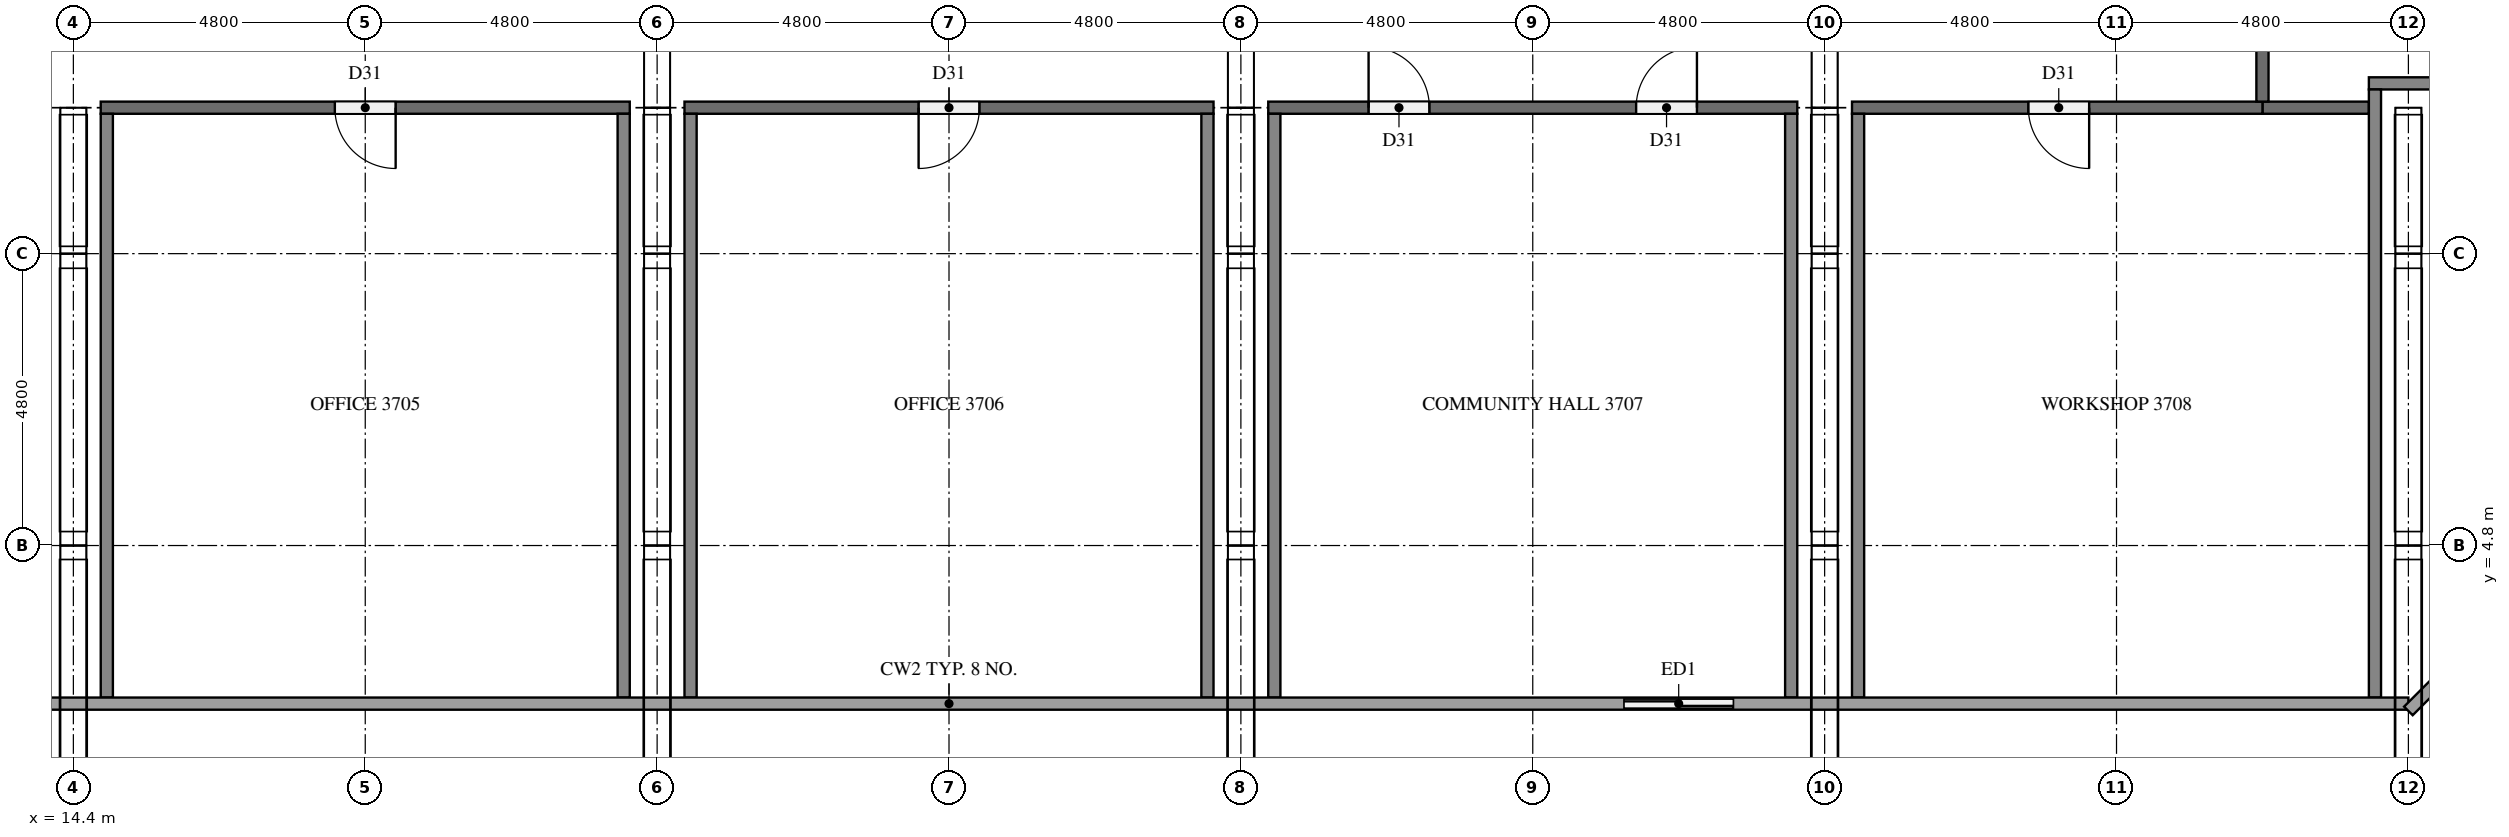
"""IFC4 building model, lengths in metres.
Left out: names, types, materials, properties, quantities, classifications, styles, units other than length and angle.
Written with IfcOpenShell. Run it as: python <this file> out.ifc"""

import sys

from ifc_helpers import new_model, si_unit, direction, frame, frame_2d, origin, place, context, subcontext, project, spatial, rectangle, extrude, element, fill, save


model = new_model("IFC4")
c1 = context("Model", 3, precision=1e-05, world=origin(), true_north=direction((0.0, 1.0)))
c2 = subcontext(c1, "Body", "Model", "MODEL_VIEW")
j1 = project(units=[si_unit("LENGTHUNIT", "METRE"), si_unit("PLANEANGLEUNIT", "RADIAN")], contexts=[c1])
p1 = place(None, origin())
s1 = spatial("IfcSite", under=j1, at=p1, CompositionType="ELEMENT")
p2 = place(p1, origin())
s2 = spatial("IfcBuilding", under=s1, at=p2, CompositionType="ELEMENT")
p3 = place(p2, frame((0.0, 0.0, 143.6)))
s3 = spatial("IfcBuildingStorey", under=s2, at=p3, CompositionType="ELEMENT", Elevation=143.6)
p4 = place(p3, frame((39.6, 2.2, 0.0), z_axis=(0.0, 0.0, 1.0), x_axis=(1.0, 0.0, 0.0)))
e1 = element("IfcWall", 1, at=p4, inside=s3, PredefinedType="SOLIDWALL", context=c2, shape_type="SweptSolid", body=[
    extrude(rectangle(XDim=2.4, YDim=0.15, at=frame_2d((1.2, 0.0))), origin(), (0.0, 0.0, 1.0), 5.1),
])
p5 = place(p4, frame((0.3, 0.0, 0.0)))
e2 = element("IfcOpeningElement", 2, at=p5, cuts=e1, PredefinedType="OPENING", context=c2, shape_type="SweptSolid", body=[
    extrude(rectangle(XDim=1.8, YDim=2.4, at=frame_2d((0.9, 1.2))), frame((0.0, 0.085, 0.0), z_axis=(0.0, -1.0, 0.0), x_axis=(1.0, 0.0, 0.0)), (0.0, 0.0, 1.0), 0.17),
])
p6 = place(p3, frame((50.4, 12.0, 0.0), z_axis=(0.0, 0.0, 1.0), x_axis=(1.0, 0.0, 0.0)))
e3 = element("IfcWall", 3, at=p6, inside=s3, PredefinedType="PARTITIONING", context=c2, shape_type="SweptSolid", body=[
    extrude(rectangle(XDim=1.75, YDim=0.2, at=frame_2d((0.875, 0.0))), origin(), (0.0, 0.0, 1.0), 5.1),
])
p7 = place(p3, frame((23.55, 12.0, 0.0), z_axis=(0.0, 0.0, 1.0), x_axis=(-1.0, 0.0, 0.0)))
e4 = element("IfcWall", 4, at=p7, inside=s3, PredefinedType="PARTITIONING", context=c2, shape_type="SweptSolid", body=[
    extrude(rectangle(XDim=8.7, YDim=0.2, at=frame_2d((4.35, 0.0))), origin(), (0.0, 0.0, 1.0), 5.1),
])
p8 = place(p7, frame((3.85, 0.0, 0.0)))
e5 = element("IfcOpeningElement", 5, at=p8, cuts=e4, PredefinedType="OPENING", context=c2, shape_type="SweptSolid", body=[
    extrude(rectangle(XDim=1.0, YDim=2.1, at=frame_2d((0.5, 1.05))), frame((0.0, 0.11, 0.0), z_axis=(0.0, -1.0, 0.0), x_axis=(1.0, 0.0, 0.0)), (0.0, 0.0, 1.0), 0.22),
])
p9 = place(p3, frame((33.15, 12.0, 0.0), z_axis=(0.0, 0.0, 1.0), x_axis=(-1.0, 0.0, 0.0)))
e6 = element("IfcWall", 6, at=p9, inside=s3, PredefinedType="PARTITIONING", context=c2, shape_type="SweptSolid", body=[
    extrude(rectangle(XDim=8.7, YDim=0.2, at=frame_2d((4.35, 0.0))), origin(), (0.0, 0.0, 1.0), 5.1),
])
p10 = place(p9, frame((3.85, 0.0, 0.0)))
e7 = element("IfcOpeningElement", 7, at=p10, cuts=e6, PredefinedType="OPENING", context=c2, shape_type="SweptSolid", body=[
    extrude(rectangle(XDim=1.0, YDim=2.1, at=frame_2d((0.5, 1.05))), frame((0.0, 0.11, 0.0), z_axis=(0.0, -1.0, 0.0), x_axis=(1.0, 0.0, 0.0)), (0.0, 0.0, 1.0), 0.22),
])
p11 = place(p3, frame((34.05, 12.0, 0.0), z_axis=(0.0, 0.0, 1.0), x_axis=(1.0, 0.0, 0.0)))
e8 = element("IfcWall", 8, at=p11, inside=s3, PredefinedType="PARTITIONING", context=c2, shape_type="SweptSolid", body=[
    extrude(rectangle(XDim=8.7, YDim=0.2, at=frame_2d((4.35, 0.0))), origin(), (0.0, 0.0, 1.0), 5.1),
])
p12 = place(p11, frame((6.05, 0.0, 0.0)))
e9 = element("IfcOpeningElement", 9, at=p12, cuts=e8, PredefinedType="OPENING", context=c2, shape_type="SweptSolid", body=[
    extrude(rectangle(XDim=1.0, YDim=2.1, at=frame_2d((0.5, 1.05))), frame((0.0, 0.11, 0.0), z_axis=(0.0, -1.0, 0.0), x_axis=(1.0, 0.0, 0.0)), (0.0, 0.0, 1.0), 0.22),
])
p13 = place(p11, frame((1.65, 0.0, 0.0)))
e10 = element("IfcOpeningElement", 10, at=p13, cuts=e8, PredefinedType="OPENING", context=c2, shape_type="SweptSolid", body=[
    extrude(rectangle(XDim=1.0, YDim=2.1, at=frame_2d((0.5, 1.05))), frame((0.0, 0.11, 0.0), z_axis=(0.0, -1.0, 0.0), x_axis=(1.0, 0.0, 0.0)), (0.0, 0.0, 1.0), 0.22),
])
p14 = place(p3, frame((50.4, 12.0, 0.0), z_axis=(0.0, 0.0, 1.0), x_axis=(-1.0, 0.0, 0.0)))
e11 = element("IfcWall", 11, at=p14, inside=s3, PredefinedType="PARTITIONING", context=c2, shape_type="SweptSolid", body=[
    extrude(rectangle(XDim=6.75, YDim=0.2, at=frame_2d((3.375, 0.0))), origin(), (0.0, 0.0, 1.0), 5.1),
])
p15 = place(p14, frame((2.85, 0.0, 0.0)))
e12 = element("IfcOpeningElement", 12, at=p15, cuts=e11, PredefinedType="OPENING", context=c2, shape_type="SweptSolid", body=[
    extrude(rectangle(XDim=1.0, YDim=2.1, at=frame_2d((0.5, 1.05))), frame((0.0, 0.11, 0.0), z_axis=(0.0, -1.0, 0.0), x_axis=(1.0, 0.0, 0.0)), (0.0, 0.0, 1.0), 0.22),
])
p16 = place(p3, frame((52.15, 12.4, 0.0), z_axis=(0.0, 0.0, 1.0), x_axis=(1.0, 0.0, 0.0)))
e13 = element("IfcWall", 13, at=p16, inside=s3, PredefinedType="PARTITIONING", context=c2, shape_type="SweptSolid", body=[
    extrude(rectangle(XDim=1.3, YDim=0.2, at=frame_2d((0.65, 0.0))), origin(), (0.0, 0.0, 1.0), 5.1),
])
for number, where, z_axis, x_axis in (
    (14, (14.95, 2.3, 0.0), (0.0, 0.0, 1.0), (0.0, 1.0, 0.0)),
    (15, (23.45, 2.3, 0.0), (0.0, 0.0, 1.0), (0.0, 1.0, 0.0)),
    (16, (24.55, 2.3, 0.0), (0.0, 0.0, 1.0), (0.0, 1.0, 0.0)),
    (17, (33.05, 2.3, 0.0), (0.0, 0.0, 1.0), (0.0, 1.0, 0.0)),
    (18, (34.15, 2.3, 0.0), (0.0, 0.0, 1.0), (0.0, 1.0, 0.0)),
    (19, (42.65, 2.3, 0.0), (0.0, 0.0, 1.0), (0.0, 1.0, 0.0)),
    (20, (43.75, 2.3, 0.0), (0.0, 0.0, 1.0), (0.0, 1.0, 0.0)),
):
    element("IfcWall", number, at=place(p3, frame(where, z_axis=z_axis, x_axis=x_axis)), inside=s3, PredefinedType="PARTITIONING", context=c2, shape_type="SweptSolid", body=[
        extrude(rectangle(XDim=9.6, YDim=0.2, at=frame_2d((4.8, 0.0))), origin(), (0.0, 0.0, 1.0), 5.1),
    ])
p17 = place(p3, frame((50.4, 40.7, 0.0), z_axis=(0.0, 0.0, 1.0), x_axis=(0.0, -1.0, 0.0)))
e21 = element("IfcWall", 21, at=p17, inside=s3, PredefinedType="PARTITIONING", context=c2, shape_type="SweptSolid", body=[
    extrude(rectangle(XDim=28.6, YDim=0.2, at=frame_2d((14.3, 0.0))), origin(), (0.0, 0.0, 1.0), 5.1),
])
p18 = place(p17, frame((24.55, 0.0, 0.0)))
e22 = element("IfcOpeningElement", 22, at=p18, cuts=e21, PredefinedType="OPENING", context=c2, shape_type="SweptSolid", body=[
    extrude(rectangle(XDim=1.0, YDim=2.1, at=frame_2d((0.5, 1.05))), frame((0.0, 0.11, 0.0), z_axis=(0.0, -1.0, 0.0), x_axis=(1.0, 0.0, 0.0)), (0.0, 0.0, 1.0), 0.22),
])
p19 = place(p17, frame((18.65, 0.0, 0.0)))
e23 = element("IfcOpeningElement", 23, at=p19, cuts=e21, PredefinedType="OPENING", context=c2, shape_type="SweptSolid", body=[
    extrude(rectangle(XDim=1.0, YDim=2.1, at=frame_2d((0.5, 1.05))), frame((0.0, 0.11, 0.0), z_axis=(0.0, -1.0, 0.0), x_axis=(1.0, 0.0, 0.0)), (0.0, 0.0, 1.0), 0.22),
])
p20 = place(p17, frame((13.85, 0.0, 0.0)))
e24 = element("IfcOpeningElement", 24, at=p20, cuts=e21, PredefinedType="OPENING", context=c2, shape_type="SweptSolid", body=[
    extrude(rectangle(XDim=1.0, YDim=2.1, at=frame_2d((0.5, 1.05))), frame((0.0, 0.11, 0.0), z_axis=(0.0, -1.0, 0.0), x_axis=(1.0, 0.0, 0.0)), (0.0, 0.0, 1.0), 0.22),
])
p21 = place(p17, frame((9.05, 0.0, 0.0)))
e25 = element("IfcOpeningElement", 25, at=p21, cuts=e21, PredefinedType="OPENING", context=c2, shape_type="SweptSolid", body=[
    extrude(rectangle(XDim=1.0, YDim=2.1, at=frame_2d((0.5, 1.05))), frame((0.0, 0.11, 0.0), z_axis=(0.0, -1.0, 0.0), x_axis=(1.0, 0.0, 0.0)), (0.0, 0.0, 1.0), 0.22),
])
p22 = place(p17, frame((3.05, 0.0, 0.0)))
e26 = element("IfcOpeningElement", 26, at=p22, cuts=e21, PredefinedType="OPENING", context=c2, shape_type="SweptSolid", body=[
    extrude(rectangle(XDim=1.0, YDim=2.1, at=frame_2d((0.5, 1.05))), frame((0.0, 0.11, 0.0), z_axis=(0.0, -1.0, 0.0), x_axis=(1.0, 0.0, 0.0)), (0.0, 0.0, 1.0), 0.22),
])
p23 = place(p3, frame((52.25, 2.3, 0.0), z_axis=(0.0, 0.0, 1.0), x_axis=(0.0, 1.0, 0.0)))
e27 = element("IfcWall", 27, at=p23, inside=s3, PredefinedType="PARTITIONING", context=c2, shape_type="SweptSolid", body=[
    extrude(rectangle(XDim=10.0, YDim=0.2, at=frame_2d((5.0, 0.0))), origin(), (0.0, 0.0, 1.0), 5.1),
])
p24 = place(p5, origin())
e28 = element("IfcDoor", 28, at=p24, inside=s3, OperationType="SLIDING_TO_LEFT", PredefinedType="DOOR", context=c2, shape_type="SweptSolid", body=[
    extrude(rectangle(XDim=1.8, YDim=2.4, at=frame_2d((0.9, 1.2))), frame((0.0, 0.025, 0.0), z_axis=(0.0, -1.0, 0.0), x_axis=(1.0, 0.0, 0.0)), (0.0, 0.0, 1.0), 0.05),
])
fill(e2, e28)
p25 = place(p8, origin())
e29 = element("IfcDoor", 29, at=p25, inside=s3, OperationType="SINGLE_SWING_LEFT", PredefinedType="DOOR", context=c2, shape_type="SweptSolid", body=[
    extrude(rectangle(XDim=1.0, YDim=2.1, at=frame_2d((0.5, 1.05))), frame((0.0, 0.025, 0.0), z_axis=(0.0, -1.0, 0.0), x_axis=(1.0, 0.0, 0.0)), (0.0, 0.0, 1.0), 0.05),
])
fill(e5, e29)
p26 = place(p10, origin())
e30 = element("IfcDoor", 30, at=p26, inside=s3, OperationType="SINGLE_SWING_RIGHT", PredefinedType="DOOR", context=c2, shape_type="SweptSolid", body=[
    extrude(rectangle(XDim=1.0, YDim=2.1, at=frame_2d((0.5, 1.05))), frame((0.0, 0.025, 0.0), z_axis=(0.0, -1.0, 0.0), x_axis=(1.0, 0.0, 0.0)), (0.0, 0.0, 1.0), 0.05),
])
fill(e7, e30)
p27 = place(p12, origin())
e31 = element("IfcDoor", 31, at=p27, inside=s3, OperationType="SINGLE_SWING_RIGHT", PredefinedType="DOOR", context=c2, shape_type="SweptSolid", body=[
    extrude(rectangle(XDim=1.0, YDim=2.1, at=frame_2d((0.5, 1.05))), frame((0.0, 0.025, 0.0), z_axis=(0.0, -1.0, 0.0), x_axis=(1.0, 0.0, 0.0)), (0.0, 0.0, 1.0), 0.05),
])
fill(e9, e31)
p28 = place(p13, origin())
e32 = element("IfcDoor", 32, at=p28, inside=s3, OperationType="SINGLE_SWING_LEFT", PredefinedType="DOOR", context=c2, shape_type="SweptSolid", body=[
    extrude(rectangle(XDim=1.0, YDim=2.1, at=frame_2d((0.5, 1.05))), frame((0.0, 0.025, 0.0), z_axis=(0.0, -1.0, 0.0), x_axis=(1.0, 0.0, 0.0)), (0.0, 0.0, 1.0), 0.05),
])
fill(e10, e32)
p29 = place(p15, origin())
e33 = element("IfcDoor", 33, at=p29, inside=s3, OperationType="SINGLE_SWING_LEFT", PredefinedType="DOOR", context=c2, shape_type="SweptSolid", body=[
    extrude(rectangle(XDim=1.0, YDim=2.1, at=frame_2d((0.5, 1.05))), frame((0.0, 0.025, 0.0), z_axis=(0.0, -1.0, 0.0), x_axis=(1.0, 0.0, 0.0)), (0.0, 0.0, 1.0), 0.05),
])
fill(e12, e33)
save(model, sys.argv[1])
